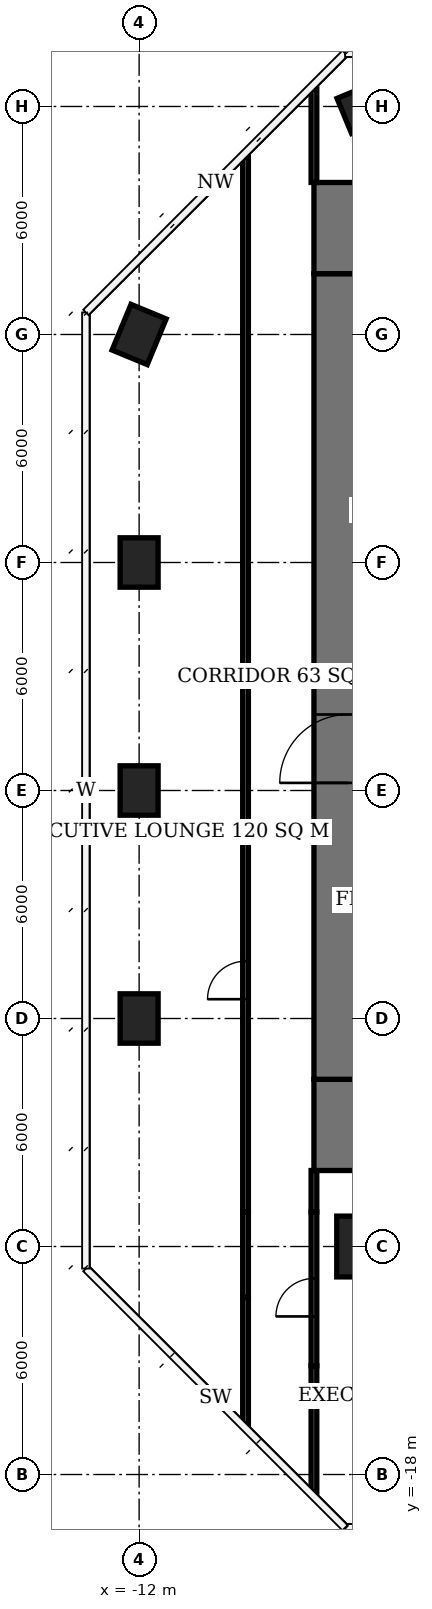
"""IFC4 building model, lengths in metres.
Left out: names, types, materials, properties, quantities, classifications, styles, units other than length and angle.
Written with IfcOpenShell. Run it as: python <this file> out.ifc"""

import sys

from ifc_helpers import new_model, si_unit, direction, frame, frame_2d, origin, origin_2d, place, context, subcontext, project, spatial, rectangle, extrude, element, fill, save


model = new_model("IFC4")
c1 = context("Model", 3, precision=1e-05, world=origin(), true_north=direction((0.0, 1.0)))
c2 = subcontext(c1, "Body", "Model", "MODEL_VIEW")
j1 = project(units=[si_unit("LENGTHUNIT", "METRE"), si_unit("PLANEANGLEUNIT", "RADIAN")], contexts=[c1])
p1 = place(None, origin())
s1 = spatial("IfcSite", under=j1, at=p1, CompositionType="ELEMENT")
p2 = place(p1, origin())
s2 = spatial("IfcBuilding", under=s1, at=p2, CompositionType="ELEMENT")
p3 = place(p2, frame((0.0, 0.0, 291.8)))
s3 = spatial("IfcBuildingStorey", under=s2, at=p3, CompositionType="ELEMENT", Elevation=291.8)
for number, where, z_axis, x_axis in (
    (1, (-12.0, -6.0, 0.0), (0.0, 0.0, 1.0), (0.0, 1.0, 0.0)),
    (2, (-12.0, 0.0, 0.0), (0.0, 0.0, 1.0), (0.0, 1.0, 0.0)),
    (3, (-12.0, 6.0, 0.0), (0.0, 0.0, 1.0), (0.0, 1.0, 0.0)),
    (4, (-12.0, 12.0, 0.0), (0.0, 0.0, 1.0), (0.383, 0.924, 0.0)),
):
    element("IfcColumn", number, at=place(p3, frame(where, z_axis=z_axis, x_axis=x_axis)), inside=s3, PredefinedType="COLUMN", context=c2, shape_type="SweptSolid", body=[
        extrude(rectangle(XDim=1.3, YDim=1.0, at=origin_2d()), origin(), (0.0, 0.0, 1.0), 3.9),
    ])
p4 = place(p3, frame((-6.0, -12.0, 0.0), z_axis=(0.0, 0.0, 1.0), x_axis=(1.0, 0.0, 0.0)))
e5 = element("IfcColumn", 5, at=p4, inside=s3, PredefinedType="COLUMN", context=c2, shape_type="SweptSolid", body=[
    extrude(rectangle(XDim=1.6, YDim=1.6, at=origin_2d()), origin(), (0.0, 0.0, 1.0), 3.9),
])
p5 = place(p3, frame((-6.0, 18.0, 0.0), z_axis=(0.0, 0.0, 1.0), x_axis=(0.923879532511, 0.382683432365, 0.0)))
e6 = element("IfcColumn", 6, at=p5, inside=s3, PredefinedType="COLUMN", context=c2, shape_type="SweptSolid", body=[
    extrude(rectangle(XDim=1.3, YDim=1.0, at=origin_2d()), origin(), (0.0, 0.0, 1.0), 3.9),
])
p6 = place(p3, frame((-6.5, -7.6, 0.0), z_axis=(0.0, 0.0, 1.0), x_axis=(0.0, 1.0, 0.0)))
e7 = element("IfcWall", 7, at=p6, inside=s3, PredefinedType="SHEAR", context=c2, shape_type="SweptSolid", body=[
    extrude(rectangle(XDim=21.2, YDim=1.8, at=frame_2d((10.6, 0.0))), origin(), (0.0, 0.0, 1.0), 3.9),
])
p7 = place(p6, frame((7.8, 0.0, 0.0)))
e8 = element("IfcOpeningElement", 8, at=p7, cuts=e7, PredefinedType="OPENING", context=c2, shape_type="SweptSolid", body=[
    extrude(rectangle(XDim=1.8, YDim=2.4, at=frame_2d((0.9, 1.2))), frame((0.0, 0.91, 0.0), z_axis=(0.0, -1.0, 0.0), x_axis=(1.0, 0.0, 0.0)), (0.0, 0.0, 1.0), 1.82),
])
for number, where, z_axis, x_axis in (
    (9, (-6.5, -10.0, 0.0), (0.0, 0.0, 1.0), (0.0, 1.0, 0.0)),
    (10, (-6.5, 13.6, 0.0), (0.0, 0.0, 1.0), (0.0, 1.0, 0.0)),
):
    element("IfcWall", number, at=place(p3, frame(where, z_axis=z_axis, x_axis=x_axis)), inside=s3, PredefinedType="SHEAR", context=c2, shape_type="SweptSolid", body=[
        extrude(rectangle(XDim=2.4, YDim=1.8, at=frame_2d((1.2, 0.0))), origin(), (0.0, 0.0, 1.0), 3.9),
    ])
p8 = place(p3, frame((-9.2, -16.664, 0.0), z_axis=(0.0, 0.0, 1.0), x_axis=(0.0, 1.0, 0.0)))
e11 = element("IfcWall", 11, at=p8, inside=s3, PredefinedType="PARTITIONING", context=c2, shape_type="SweptSolid", body=[
    extrude(rectangle(XDim=3.324, YDim=0.15, at=frame_2d((1.662, 0.0))), origin(), (0.0, 0.0, 1.0), 3.65),
])
p9 = place(p3, frame((-9.2, -13.34, 0.0), z_axis=(0.0, 0.0, 1.0), x_axis=(0.0, 1.0, 0.0)))
e12 = element("IfcWall", 12, at=p9, inside=s3, PredefinedType="PARTITIONING", context=c2, shape_type="SweptSolid", body=[
    extrude(rectangle(XDim=2.25, YDim=0.15, at=frame_2d((1.125, 0.0))), origin(), (0.0, 0.0, 1.0), 2.65),
])
p10 = place(p3, frame((-9.2, -11.09, 0.0), z_axis=(0.0, 0.0, 1.0), x_axis=(0.0, 1.0, 0.0)))
e13 = element("IfcWall", 13, at=p10, inside=s3, PredefinedType="PARTITIONING", context=c2, shape_type="SweptSolid", body=[
    extrude(rectangle(XDim=27.754, YDim=0.15, at=frame_2d((13.877, 0.0))), origin(), (0.0, 0.0, 1.0), 3.65),
])
p11 = place(p10, frame((5.598, 0.0, 0.0)))
e14 = element("IfcOpeningElement", 14, at=p11, cuts=e13, PredefinedType="OPENING", context=c2, shape_type="SweptSolid", body=[
    extrude(rectangle(XDim=1.0, YDim=2.4, at=frame_2d((0.5, 1.2))), frame((0.0, 0.085, 0.0), z_axis=(0.0, -1.0, 0.0), x_axis=(1.0, 0.0, 0.0)), (0.0, 0.0, 1.0), 0.17),
])
p12 = place(p3, frame((-7.4, -18.464, 0.0), z_axis=(0.0, 0.0, 1.0), x_axis=(0.0, 1.0, 0.0)))
e15 = element("IfcWall", 15, at=p12, inside=s3, PredefinedType="PARTITIONING", context=c2, shape_type="SweptSolid", body=[
    extrude(rectangle(XDim=3.324, YDim=0.15, at=frame_2d((1.662, 0.0))), origin(), (0.0, 0.0, 1.0), 3.65),
])
p13 = place(p3, frame((-7.4, -15.14, 0.0), z_axis=(0.0, 0.0, 1.0), x_axis=(0.0, 1.0, 0.0)))
e16 = element("IfcWall", 16, at=p13, inside=s3, PredefinedType="PARTITIONING", context=c2, shape_type="SweptSolid", body=[
    extrude(rectangle(XDim=4.05, YDim=0.15, at=frame_2d((2.025, 0.0))), origin(), (0.0, 0.0, 1.0), 2.65),
])
p14 = place(p13, frame((1.3, 0.0, 0.0)))
e17 = element("IfcOpeningElement", 17, at=p14, cuts=e16, PredefinedType="OPENING", context=c2, shape_type="SweptSolid", body=[
    extrude(rectangle(XDim=1.0, YDim=2.1, at=frame_2d((0.5, 1.05))), frame((0.0, 0.085, 0.0), z_axis=(0.0, -1.0, 0.0), x_axis=(1.0, 0.0, 0.0)), (0.0, 0.0, 1.0), 0.17),
])
p15 = place(p3, frame((-7.4, -11.09, 0.0), z_axis=(0.0, 0.0, 1.0), x_axis=(0.0, 1.0, 0.0)))
e18 = element("IfcWall", 18, at=p15, inside=s3, PredefinedType="PARTITIONING", context=c2, shape_type="SweptSolid", body=[
    extrude(rectangle(XDim=1.09, YDim=0.15, at=frame_2d((0.545, 0.0))), origin(), (0.0, 0.0, 1.0), 3.65),
])
p16 = place(p3, frame((-7.4, 16.0, 0.0), z_axis=(0.0, 0.0, 1.0), x_axis=(0.0, 1.0, 0.0)))
e19 = element("IfcWall", 19, at=p16, inside=s3, PredefinedType="PARTITIONING", context=c2, shape_type="SweptSolid", body=[
    extrude(rectangle(XDim=2.464, YDim=0.15, at=frame_2d((1.232, 0.0))), origin(), (0.0, 0.0, 1.0), 3.65),
])
p17 = place(p7, origin())
e20 = element("IfcDoor", 20, at=p17, inside=s3, OperationType="DOUBLE_DOOR_SINGLE_SWING", PredefinedType="DOOR", context=c2, shape_type="SweptSolid", body=[
    extrude(rectangle(XDim=1.8, YDim=2.4, at=frame_2d((0.9, 1.2))), frame((0.0, 0.025, 0.0), z_axis=(0.0, -1.0, 0.0), x_axis=(1.0, 0.0, 0.0)), (0.0, 0.0, 1.0), 0.05),
])
fill(e8, e20)
p18 = place(p11, origin())
e21 = element("IfcDoor", 21, at=p18, inside=s3, OperationType="SINGLE_SWING_LEFT", PredefinedType="DOOR", context=c2, shape_type="SweptSolid", body=[
    extrude(rectangle(XDim=1.0, YDim=2.4, at=frame_2d((0.5, 1.2))), frame((0.0, 0.025, 0.0), z_axis=(0.0, -1.0, 0.0), x_axis=(1.0, 0.0, 0.0)), (0.0, 0.0, 1.0), 0.05),
])
fill(e14, e21)
p19 = place(p14, origin())
e22 = element("IfcDoor", 22, at=p19, inside=s3, OperationType="SINGLE_SWING_LEFT", PredefinedType="DOOR", context=c2, shape_type="SweptSolid", body=[
    extrude(rectangle(XDim=1.0, YDim=2.1, at=frame_2d((0.5, 1.05))), frame((0.0, 0.025, 0.0), z_axis=(0.0, -1.0, 0.0), x_axis=(1.0, 0.0, 0.0)), (0.0, 0.0, 1.0), 0.05),
])
fill(e17, e22)
save(model, sys.argv[1])
